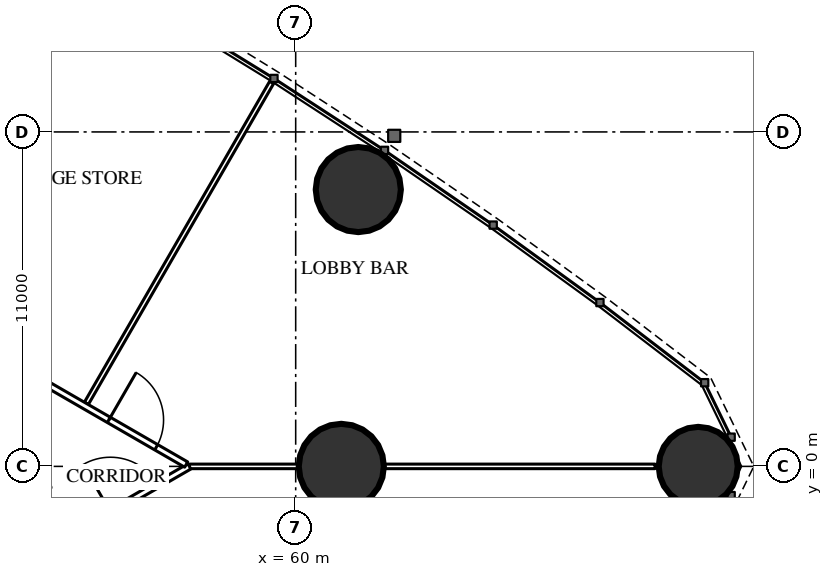
"""IFC4 building model, lengths in metres.
Left out: names, types, materials, properties, quantities, classifications, styles, units other than length and angle.
Written with IfcOpenShell. Run it as: python <this file> out.ifc"""

import sys

from ifc_helpers import new_model, si_unit, direction, frame, frame_2d, origin, origin_2d, place, context, subcontext, project, spatial, rectangle, hollow_circle, extrude, element, fill, save


model = new_model("IFC4")
c1 = context("Model", 3, precision=1e-05, world=origin(), true_north=direction((0.0, 1.0)))
c2 = subcontext(c1, "Body", "Model", "MODEL_VIEW")
j1 = project(units=[si_unit("LENGTHUNIT", "METRE"), si_unit("PLANEANGLEUNIT", "RADIAN")], contexts=[c1])
p1 = place(None, origin())
s1 = spatial("IfcSite", under=j1, at=p1, CompositionType="ELEMENT")
p2 = place(p1, origin())
s2 = spatial("IfcBuilding", under=s1, at=p2, CompositionType="ELEMENT")
p3 = place(p2, origin())
s3 = spatial("IfcBuildingStorey", under=s2, at=p3, CompositionType="ELEMENT", Elevation=0.0)
p4 = place(p3, frame((73.239, 0.0, 0.0), z_axis=(0.0, 0.0, 1.0), x_axis=(1.0, 0.0, 0.0)))
e1 = element("IfcColumn", 1, at=p4, inside=s3, PredefinedType="COLUMN", context=c2, shape_type="SweptSolid", body=[
    extrude(hollow_circle(Radius=1.3, WallThickness=0.1, at=origin_2d()), origin(), (0.0, 0.0, 1.0), 7.2),
])
p5 = place(p3, frame((62.059, 9.105, 0.0), z_axis=(0.0, 0.0, 1.0), x_axis=(1.0, 0.0, 0.0)))
e2 = element("IfcColumn", 2, at=p5, inside=s3, PredefinedType="COLUMN", context=c2, shape_type="SweptSolid", body=[
    extrude(hollow_circle(Radius=1.4, WallThickness=0.12, at=origin_2d()), origin(), (0.0, 0.0, 1.0), 7.2),
])
p6 = place(p3, frame((61.5, 0.0, 0.0), z_axis=(0.0, 0.0, 1.0), x_axis=(1.0, 0.0, 0.0)))
e3 = element("IfcColumn", 3, at=p6, inside=s3, PredefinedType="COLUMN", context=c2, shape_type="SweptSolid", body=[
    extrude(hollow_circle(Radius=1.4, WallThickness=0.1, at=origin_2d()), origin(), (0.0, 0.0, 1.0), 7.2),
])
p7 = place(p3, frame((53.115, 2.071, 0.0), z_axis=(0.0, 0.0, 1.0), x_axis=(0.500000975677, 0.866024840476, 0.0)))
e4 = element("IfcWall", 4, at=p7, inside=s3, PredefinedType="PARTITIONING", context=c2, shape_type="SweptSolid", body=[
    extrude(rectangle(XDim=12.191, YDim=0.15, at=frame_2d((6.095, 0.0))), origin(), (0.0, 0.0, 1.0), 6.85),
])
p8 = place(p3, frame((56.502, 0.0, 0.0), z_axis=(0.0, 0.0, 1.0), x_axis=(1.0, 0.0, 0.0)))
e5 = element("IfcWall", 5, at=p8, inside=s3, PredefinedType="PARTITIONING", context=c2, shape_type="SweptSolid", body=[
    extrude(rectangle(XDim=15.317, YDim=0.15, at=frame_2d((7.658, 0.0))), origin(), (0.0, 0.0, 1.0), 5.85),
])
p9 = place(p3, frame((38.16, -10.59, 0.0), z_axis=(0.0, 0.0, 1.0), x_axis=(0.866027029586, 0.499997184019, 0.0)))
e6 = element("IfcWall", 6, at=p9, inside=s3, PredefinedType="PARTITIONING", context=c2, shape_type="SweptSolid", body=[
    extrude(rectangle(XDim=21.18, YDim=0.2, at=frame_2d((10.59, 0.0))), origin(), (0.0, 0.0, 1.0), 6.85),
])
p10 = place(p9, frame((14.142, 0.0, 0.0)))
e7 = element("IfcOpeningElement", 7, at=p10, cuts=e6, PredefinedType="OPENING", context=c2, shape_type="SweptSolid", body=[
    extrude(rectangle(XDim=1.8, YDim=2.2, at=frame_2d((0.9, 1.1))), frame((0.0, 0.11, 0.0), z_axis=(0.0, -1.0, 0.0), x_axis=(1.0, 0.0, 0.0)), (0.0, 0.0, 1.0), 0.22),
])
p11 = place(p9, frame((18.183, 0.0, 0.0)))
e8 = element("IfcOpeningElement", 8, at=p11, cuts=e6, PredefinedType="OPENING", context=c2, shape_type="SweptSolid", body=[
    extrude(rectangle(XDim=1.8, YDim=2.2, at=frame_2d((0.9, 1.1))), frame((0.0, 0.11, 0.0), z_axis=(0.0, -1.0, 0.0), x_axis=(1.0, 0.0, 0.0)), (0.0, 0.0, 1.0), 0.22),
])
p12 = place(p9, frame((5.65, 0.0, 0.0)))
e9 = element("IfcOpeningElement", 9, at=p12, cuts=e6, PredefinedType="OPENING", context=c2, shape_type="SweptSolid", body=[
    extrude(rectangle(XDim=1.8, YDim=2.2, at=frame_2d((0.9, 1.1))), frame((0.0, 0.11, 0.0), z_axis=(0.0, -1.0, 0.0), x_axis=(1.0, 0.0, 0.0)), (0.0, 0.0, 1.0), 0.22),
])
p13 = place(p3, frame((37.034, 11.24, 0.0), z_axis=(0.0, 0.0, 1.0), x_axis=(0.866025942536, -0.499999066854, 0.0)))
e10 = element("IfcWall", 10, at=p13, inside=s3, PredefinedType="PARTITIONING", context=c2, shape_type="SweptSolid", body=[
    extrude(rectangle(XDim=22.36, YDim=0.2, at=frame_2d((11.18, 0.0))), origin(), (0.0, 0.0, 1.0), 6.85),
])
p14 = place(p13, frame((19.423, 0.0, 0.0)))
e11 = element("IfcOpeningElement", 11, at=p14, cuts=e10, PredefinedType="OPENING", context=c2, shape_type="SweptSolid", body=[
    extrude(rectangle(XDim=1.8, YDim=2.2, at=frame_2d((0.9, 1.1))), frame((0.0, 0.11, 0.0), z_axis=(0.0, -1.0, 0.0), x_axis=(1.0, 0.0, 0.0)), (0.0, 0.0, 1.0), 0.22),
])
p15 = place(p13, frame((13.174, 0.0, 0.0)))
e12 = element("IfcOpeningElement", 12, at=p15, cuts=e10, PredefinedType="OPENING", context=c2, shape_type="SweptSolid", body=[
    extrude(rectangle(XDim=2.0, YDim=2.4, at=frame_2d((1.0, 1.2))), frame((0.0, 0.11, 0.0), z_axis=(0.0, -1.0, 0.0), x_axis=(1.0, 0.0, 0.0)), (0.0, 0.0, 1.0), 0.22),
])
p16 = place(p13, frame((4.602, 0.0, 0.0)))
e13 = element("IfcOpeningElement", 13, at=p16, cuts=e10, PredefinedType="OPENING", context=c2, shape_type="SweptSolid", body=[
    extrude(rectangle(XDim=1.8, YDim=2.2, at=frame_2d((0.9, 1.1))), frame((0.0, 0.11, 0.0), z_axis=(0.0, -1.0, 0.0), x_axis=(1.0, 0.0, 0.0)), (0.0, 0.0, 1.0), 0.22),
])
p17 = place(p11, origin())
e14 = element("IfcDoor", 14, at=p17, inside=s3, OperationType="DOUBLE_DOOR_SINGLE_SWING", PredefinedType="DOOR", context=c2, shape_type="SweptSolid", body=[
    extrude(rectangle(XDim=1.8, YDim=2.2, at=frame_2d((0.9, 1.1))), frame((0.0, 0.025, 0.0), z_axis=(0.0, -1.0, 0.0), x_axis=(1.0, 0.0, 0.0)), (0.0, 0.0, 1.0), 0.05),
])
fill(e8, e14)
p18 = place(p14, origin())
e15 = element("IfcDoor", 15, at=p18, inside=s3, OperationType="DOUBLE_DOOR_SINGLE_SWING", PredefinedType="DOOR", context=c2, shape_type="SweptSolid", body=[
    extrude(rectangle(XDim=1.8, YDim=2.2, at=frame_2d((0.9, 1.1))), frame((0.0, 0.025, 0.0), z_axis=(0.0, -1.0, 0.0), x_axis=(1.0, 0.0, 0.0)), (0.0, 0.0, 1.0), 0.05),
])
fill(e11, e15)
save(model, sys.argv[1])
